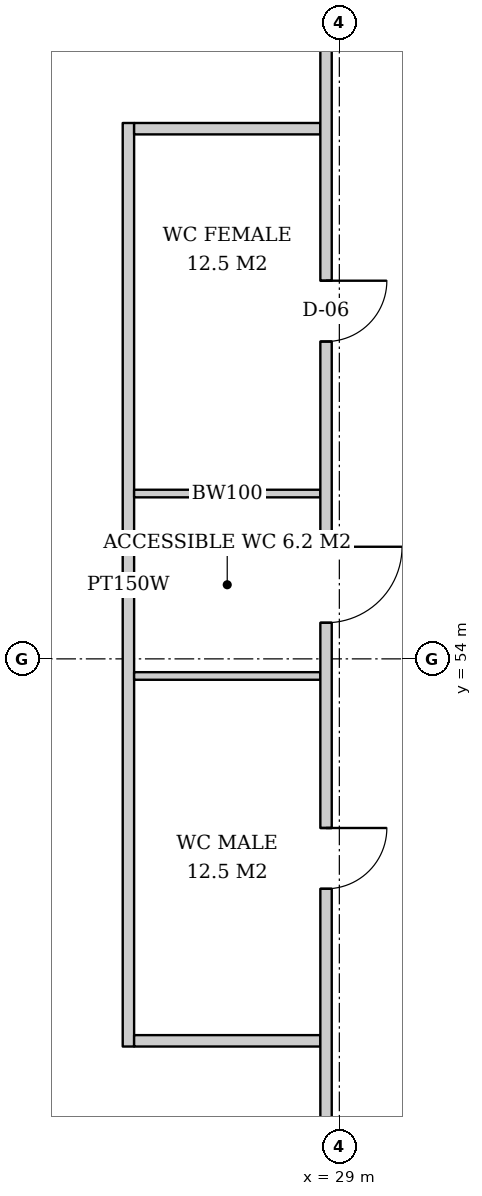
"""IFC4 building model, lengths in metres.
Left out: names, types, materials, properties, quantities, classifications, styles, units other than length and angle.
Written with IfcOpenShell. Run it as: python <this file> out.ifc"""

import sys

from ifc_helpers import new_model, si_unit, direction, frame, frame_2d, origin, place, context, subcontext, project, spatial, rectangle, extrude, element, fill, save


model = new_model("IFC4")
c1 = context("Model", 3, precision=1e-05, world=origin(), true_north=direction((0.0, 1.0)))
c2 = subcontext(c1, "Body", "Model", "MODEL_VIEW")
j1 = project(units=[si_unit("LENGTHUNIT", "METRE"), si_unit("PLANEANGLEUNIT", "RADIAN")], contexts=[c1])
p1 = place(None, origin())
s1 = spatial("IfcSite", under=j1, at=p1, CompositionType="ELEMENT")
p2 = place(p1, origin())
s2 = spatial("IfcBuilding", under=s1, at=p2, CompositionType="ELEMENT")
p3 = place(p2, frame((0.0, 0.0, 28.6)))
s3 = spatial("IfcBuildingStorey", under=s2, at=p3, CompositionType="ELEMENT", Elevation=28.6)
p4 = place(p3, frame((26.225, 61.05, 0.0), z_axis=(0.0, 0.0, 1.0), x_axis=(0.0, -1.0, 0.0)))
e1 = element("IfcWall", 1, at=p4, inside=s3, PredefinedType="PARTITIONING", context=c2, shape_type="SweptSolid", body=[
    extrude(rectangle(XDim=12.15, YDim=0.15, at=frame_2d((6.075, 0.0))), origin(), (0.0, 0.0, 1.0), 2.612),
])
p5 = place(p3, frame((28.75, 60.975, 0.0), z_axis=(0.0, 0.0, 1.0), x_axis=(-1.0, 0.0, 0.0)))
e2 = element("IfcWall", 2, at=p5, inside=s3, PredefinedType="PARTITIONING", context=c2, shape_type="SweptSolid", body=[
    extrude(rectangle(XDim=2.45, YDim=0.15, at=frame_2d((1.225, 0.0))), origin(), (0.0, 0.0, 1.0), 3.62),
])
for number, where, z_axis, x_axis in (
    (3, (28.75, 56.175, 0.0), (0.0, 0.0, 1.0), (-1.0, 0.0, 0.0)),
    (4, (28.75, 53.775, 0.0), (0.0, 0.0, 1.0), (-1.0, 0.0, 0.0)),
):
    element("IfcWall", number, at=place(p3, frame(where, z_axis=z_axis, x_axis=x_axis)), inside=s3, PredefinedType="SOLIDWALL", context=c2, shape_type="SweptSolid", body=[
        extrude(rectangle(XDim=2.45, YDim=0.1, at=frame_2d((1.225, 0.0))), origin(), (0.0, 0.0, 1.0), 3.62),
    ])
p6 = place(p3, frame((28.75, 48.975, 0.0), z_axis=(0.0, 0.0, 1.0), x_axis=(-1.0, 0.0, 0.0)))
e5 = element("IfcWall", 5, at=p6, inside=s3, PredefinedType="PARTITIONING", context=c2, shape_type="SweptSolid", body=[
    extrude(rectangle(XDim=2.45, YDim=0.15, at=frame_2d((1.225, 0.0))), origin(), (0.0, 0.0, 1.0), 3.62),
])
p7 = place(p3, frame((28.825, 62.25, 0.0), z_axis=(0.0, 0.0, 1.0), x_axis=(0.0, -1.0, 0.0)))
e6 = element("IfcWall", 6, at=p7, inside=s3, PredefinedType="PARTITIONING", context=c2, shape_type="SweptSolid", body=[
    extrude(rectangle(XDim=32.35, YDim=0.15, at=frame_2d((16.175, 0.0))), origin(), (0.0, 0.0, 1.0), 2.612),
])
p8 = place(p7, frame((3.275, 0.0, 0.0)))
e7 = element("IfcOpeningElement", 7, at=p8, cuts=e6, PredefinedType="OPENING", context=c2, shape_type="SweptSolid", body=[
    extrude(rectangle(XDim=0.8, YDim=2.1, at=frame_2d((0.4, 1.05))), frame((0.0, 0.085, 0.0), z_axis=(0.0, -1.0, 0.0), x_axis=(1.0, 0.0, 0.0)), (0.0, 0.0, 1.0), 0.17),
])
p9 = place(p7, frame((6.775, 0.0, 0.0)))
e8 = element("IfcOpeningElement", 8, at=p9, cuts=e6, PredefinedType="OPENING", context=c2, shape_type="SweptSolid", body=[
    extrude(rectangle(XDim=1.0, YDim=2.1, at=frame_2d((0.5, 1.05))), frame((0.0, 0.085, 0.0), z_axis=(0.0, -1.0, 0.0), x_axis=(1.0, 0.0, 0.0)), (0.0, 0.0, 1.0), 0.17),
])
p10 = place(p7, frame((10.475, 0.0, 0.0)))
e9 = element("IfcOpeningElement", 9, at=p10, cuts=e6, PredefinedType="OPENING", context=c2, shape_type="SweptSolid", body=[
    extrude(rectangle(XDim=0.8, YDim=2.1, at=frame_2d((0.4, 1.05))), frame((0.0, 0.085, 0.0), z_axis=(0.0, -1.0, 0.0), x_axis=(1.0, 0.0, 0.0)), (0.0, 0.0, 1.0), 0.17),
])
p11 = place(p8, origin())
e10 = element("IfcDoor", 10, at=p11, inside=s3, OperationType="SINGLE_SWING_LEFT", PredefinedType="DOOR", context=c2, shape_type="SweptSolid", body=[
    extrude(rectangle(XDim=0.8, YDim=2.1, at=frame_2d((0.4, 1.05))), frame((0.0, 0.025, 0.0), z_axis=(0.0, -1.0, 0.0), x_axis=(1.0, 0.0, 0.0)), (0.0, 0.0, 1.0), 0.05),
])
fill(e7, e10)
p12 = place(p9, origin())
e11 = element("IfcDoor", 11, at=p12, inside=s3, OperationType="SINGLE_SWING_LEFT", PredefinedType="DOOR", context=c2, shape_type="SweptSolid", body=[
    extrude(rectangle(XDim=1.0, YDim=2.1, at=frame_2d((0.5, 1.05))), frame((0.0, 0.025, 0.0), z_axis=(0.0, -1.0, 0.0), x_axis=(1.0, 0.0, 0.0)), (0.0, 0.0, 1.0), 0.05),
])
fill(e8, e11)
p13 = place(p10, origin())
e12 = element("IfcDoor", 12, at=p13, inside=s3, OperationType="SINGLE_SWING_LEFT", PredefinedType="DOOR", context=c2, shape_type="SweptSolid", body=[
    extrude(rectangle(XDim=0.8, YDim=2.1, at=frame_2d((0.4, 1.05))), frame((0.0, 0.025, 0.0), z_axis=(0.0, -1.0, 0.0), x_axis=(1.0, 0.0, 0.0)), (0.0, 0.0, 1.0), 0.05),
])
fill(e9, e12)
save(model, sys.argv[1])
